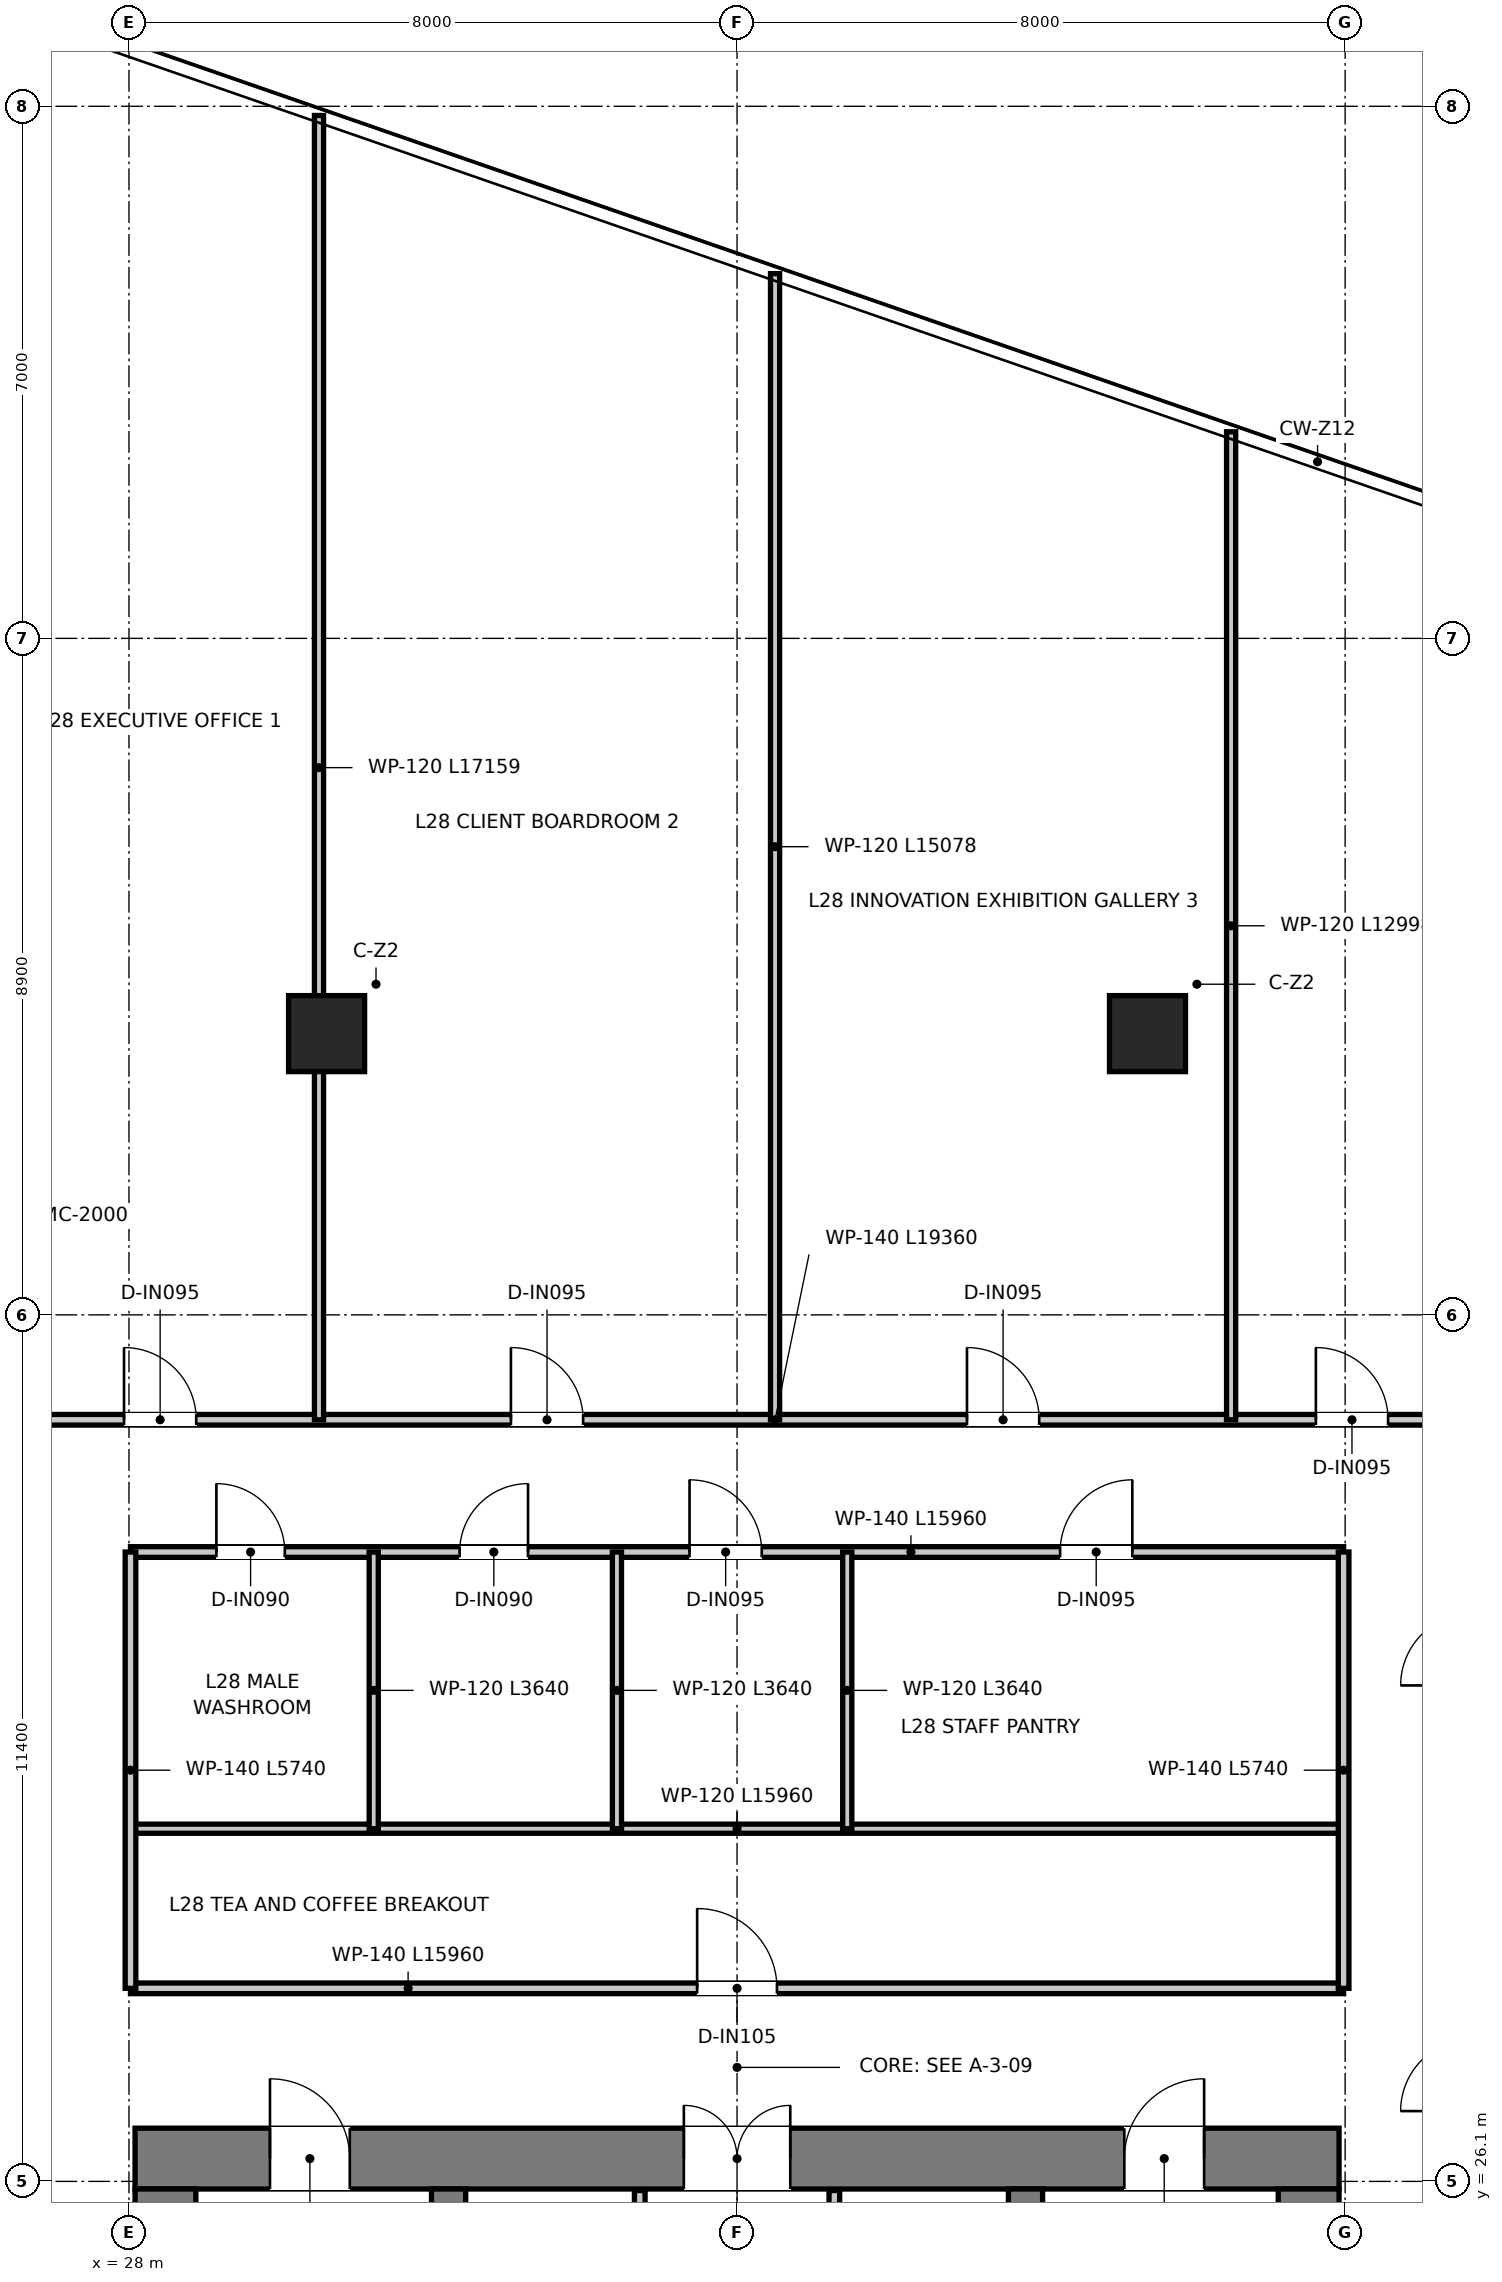
"""IFC4 building model, lengths in metres.
Left out: names, types, materials, properties, quantities, classifications, styles, units other than length and angle.
Written with IfcOpenShell. Run it as: python <this file> out.ifc"""

import sys

from ifc_helpers import new_model, si_unit, direction, frame, frame_2d, origin, origin_2d, place, context, subcontext, project, spatial, rectangle, extrude, source, transform, mapped, element, fill, save


model = new_model("IFC4")
c1 = context("Model", 3, precision=1e-05, world=origin(), true_north=direction((0.0, 1.0)))
c2 = subcontext(c1, "Body", "Model", "MODEL_VIEW")
j1 = project(units=[si_unit("LENGTHUNIT", "METRE"), si_unit("PLANEANGLEUNIT", "RADIAN")], contexts=[c1])
p1 = place(None, origin())
s1 = spatial("IfcSite", under=j1, at=p1, CompositionType="ELEMENT")
p2 = place(p1, origin())
s2 = spatial("IfcBuilding", under=s1, at=p2, CompositionType="ELEMENT")
p3 = place(p2, frame((0.0, 0.0, 117.7)))
s3 = spatial("IfcBuildingStorey", under=s2, at=p3, CompositionType="ELEMENT", Elevation=117.7)
p4 = place(p3, frame((28.08, 26.4, 0.0), z_axis=(0.0, 0.0, 1.0), x_axis=(1.0, 0.0, 0.0)))
e1 = element("IfcWall", 1, at=p4, inside=s3, PredefinedType="SHEAR", context=c2, shape_type="SweptSolid", body=[
    extrude(rectangle(XDim=15.84, YDim=0.8, at=frame_2d((7.92, 0.0))), origin(), (0.0, 0.0, 1.0), 3.95),
])
p5 = place(p4, frame((7.22, 0.0, 0.0)))
e2 = element("IfcOpeningElement", 2, at=p5, cuts=e1, PredefinedType="OPENING", context=c2, shape_type="SweptSolid", body=[
    extrude(rectangle(XDim=1.4, YDim=2.2, at=frame_2d((0.7, 1.1))), frame((0.0, 0.41, 0.0), z_axis=(0.0, -1.0, 0.0), x_axis=(1.0, 0.0, 0.0)), (0.0, 0.0, 1.0), 0.82),
])
p6 = place(p4, frame((1.775, 0.0, 0.0)))
e3 = element("IfcOpeningElement", 3, at=p6, cuts=e1, PredefinedType="OPENING", context=c2, shape_type="SweptSolid", body=[
    extrude(rectangle(XDim=1.05, YDim=2.1, at=frame_2d((0.525, 1.05))), frame((0.0, 0.41, 0.0), z_axis=(0.0, -1.0, 0.0), x_axis=(1.0, 0.0, 0.0)), (0.0, 0.0, 1.0), 0.82),
])
p7 = place(p4, frame((13.015, 0.0, 0.0)))
e4 = element("IfcOpeningElement", 4, at=p7, cuts=e1, PredefinedType="OPENING", context=c2, shape_type="SweptSolid", body=[
    extrude(rectangle(XDim=1.05, YDim=2.1, at=frame_2d((0.525, 1.05))), frame((0.0, 0.41, 0.0), z_axis=(0.0, -1.0, 0.0), x_axis=(1.0, 0.0, 0.0)), (0.0, 0.0, 1.0), 0.82),
])
for number, where, z_axis, x_axis in (
    (5, (28.48, 11.3, 0.0), (0.0, 0.0, 1.0), (0.0, 1.0, 0.0)),
    (6, (43.52, 11.3, 0.0), (0.0, 0.0, 1.0), (0.0, 1.0, 0.0)),
):
    element("IfcWall", number, at=place(p3, frame(where, z_axis=z_axis, x_axis=x_axis)), inside=s3, PredefinedType="SHEAR", context=c2, shape_type="SweptSolid", body=[
        extrude(rectangle(XDim=14.7, YDim=0.8, at=frame_2d((7.35, 0.0))), origin(), (0.0, 0.0, 1.0), 3.95),
    ])
p8 = place(p3, frame((32.205, 13.22, 0.0), z_axis=(0.0, 0.0, 1.0), x_axis=(0.0, 1.0, 0.0)))
e7 = element("IfcWall", 7, at=p8, inside=s3, PredefinedType="SHEAR", context=c2, shape_type="SweptSolid", body=[
    extrude(rectangle(XDim=12.78, YDim=0.45, at=frame_2d((6.39, 0.0))), origin(), (0.0, 0.0, 1.0), 3.95),
])
p9 = place(p8, frame((10.58, 0.0, 0.0)))
e8 = element("IfcOpeningElement", 8, at=p9, cuts=e7, PredefinedType="OPENING", context=c2, shape_type="SweptSolid", body=[
    extrude(rectangle(XDim=1.1, YDim=2.15, at=frame_2d((0.55, 1.075))), frame((0.0, 0.235, 0.0), z_axis=(0.0, -1.0, 0.0), x_axis=(1.0, 0.0, 0.0)), (0.0, 0.0, 1.0), 0.47),
])
p10 = place(p3, frame((39.795, 13.22, 0.0), z_axis=(0.0, 0.0, 1.0), x_axis=(0.0, 1.0, 0.0)))
e9 = element("IfcWall", 9, at=p10, inside=s3, PredefinedType="SHEAR", context=c2, shape_type="SweptSolid", body=[
    extrude(rectangle(XDim=12.78, YDim=0.45, at=frame_2d((6.39, 0.0))), origin(), (0.0, 0.0, 1.0), 3.95),
])
p11 = place(p10, frame((10.58, 0.0, 0.0)))
e10 = element("IfcOpeningElement", 10, at=p11, cuts=e9, PredefinedType="OPENING", context=c2, shape_type="SweptSolid", body=[
    extrude(rectangle(XDim=1.1, YDim=2.15, at=frame_2d((0.55, 1.075))), frame((0.0, 0.235, 0.0), z_axis=(0.0, -1.0, 0.0), x_axis=(1.0, 0.0, 0.0)), (0.0, 0.0, 1.0), 0.47),
])
m1 = source(origin(), c2, "Body", "SweptSolid", [
    extrude(rectangle(XDim=1.0, YDim=1.0, at=origin_2d()), origin(), (0.0, 0.0, 1.0), 3.95),
])
for number, where, z_axis, x_axis in (
    (11, (30.6, 41.2, 0.0), (0.0, 0.0, 1.0), (1.0, 0.0, 0.0)),
    (12, (41.4, 41.2, 0.0), (0.0, 0.0, 1.0), (1.0, 0.0, 0.0)),
):
    element("IfcColumn", number, at=place(p3, frame(where, z_axis=z_axis, x_axis=x_axis)), inside=s3, PredefinedType="COLUMN", context=c2, shape_type="MappedRepresentation", body=[
        mapped(m1, transform((0.0, 0.0, 0.0), x_axis=(1.0, 0.0, 0.0), y_axis=(0.0, 1.0, 0.0), z_axis=(0.0, 0.0, 1.0), scale=1.0)),
    ])
p12 = place(p3, frame((34.72, 20.2, 0.0), z_axis=(0.0, 0.0, 1.0), x_axis=(0.0, 1.0, 0.0)))
e13 = element("IfcWall", 13, at=p12, inside=s3, PredefinedType="PARTITIONING", context=c2, shape_type="SweptSolid", body=[
    extrude(rectangle(XDim=5.78, YDim=0.14, at=frame_2d((2.89, 0.0))), origin(), (0.0, 0.0, 1.0), 2.67),
])
p13 = place(p12, frame((1.05, 0.0, 0.0)))
e14 = element("IfcOpeningElement", 14, at=p13, cuts=e13, PredefinedType="OPENING", context=c2, shape_type="SweptSolid", body=[
    extrude(rectangle(XDim=0.9, YDim=2.1, at=frame_2d((0.45, 1.05))), frame((0.0, 0.08, 0.0), z_axis=(0.0, -1.0, 0.0), x_axis=(1.0, 0.0, 0.0)), (0.0, 0.0, 1.0), 0.16),
])
p14 = place(p3, frame((37.28, 20.2, 0.0), z_axis=(0.0, 0.0, 1.0), x_axis=(0.0, 1.0, 0.0)))
e15 = element("IfcWall", 15, at=p14, inside=s3, PredefinedType="PARTITIONING", context=c2, shape_type="SweptSolid", body=[
    extrude(rectangle(XDim=5.78, YDim=0.14, at=frame_2d((2.89, 0.0))), origin(), (0.0, 0.0, 1.0), 2.67),
])
p15 = place(p14, frame((0.95, 0.0, 0.0)))
e16 = element("IfcOpeningElement", 16, at=p15, cuts=e15, PredefinedType="OPENING", context=c2, shape_type="SweptSolid", body=[
    extrude(rectangle(XDim=1.1, YDim=2.15, at=frame_2d((0.55, 1.075))), frame((0.0, 0.08, 0.0), z_axis=(0.0, -1.0, 0.0), x_axis=(1.0, 0.0, 0.0)), (0.0, 0.0, 1.0), 0.16),
])
p16 = place(p3, frame((28.02, 28.64, 0.0), z_axis=(0.0, 0.0, 1.0), x_axis=(1.0, 0.0, 0.0)))
e17 = element("IfcWall", 17, at=p16, inside=s3, PredefinedType="PARTITIONING", context=c2, shape_type="SweptSolid", body=[
    extrude(rectangle(XDim=15.96, YDim=0.14, at=frame_2d((7.98, 0.0))), origin(), (0.0, 0.0, 1.0), 3.08),
])
p17 = place(p16, frame((7.455, 0.0, 0.0)))
e18 = element("IfcOpeningElement", 18, at=p17, cuts=e17, PredefinedType="OPENING", context=c2, shape_type="SweptSolid", body=[
    extrude(rectangle(XDim=1.05, YDim=2.15, at=frame_2d((0.525, 1.075))), frame((0.0, 0.08, 0.0), z_axis=(0.0, -1.0, 0.0), x_axis=(1.0, 0.0, 0.0)), (0.0, 0.0, 1.0), 0.16),
])
p18 = place(p3, frame((28.02, 30.74, 0.0), z_axis=(0.0, 0.0, 1.0), x_axis=(1.0, 0.0, 0.0)))
e19 = element("IfcWall", 19, at=p18, inside=s3, PredefinedType="PARTITIONING", context=c2, shape_type="SweptSolid", body=[
    extrude(rectangle(XDim=15.96, YDim=0.12, at=frame_2d((7.98, 0.0))), origin(), (0.0, 0.0, 1.0), 3.08),
])
p19 = place(p3, frame((28.02, 34.38, 0.0), z_axis=(0.0, 0.0, 1.0), x_axis=(1.0, 0.0, 0.0)))
e20 = element("IfcWall", 20, at=p19, inside=s3, PredefinedType="PARTITIONING", context=c2, shape_type="SweptSolid", body=[
    extrude(rectangle(XDim=15.96, YDim=0.14, at=frame_2d((7.98, 0.0))), origin(), (0.0, 0.0, 1.0), 3.08),
])
p20 = place(p19, frame((1.13, 0.0, 0.0)))
e21 = element("IfcOpeningElement", 21, at=p20, cuts=e20, PredefinedType="OPENING", context=c2, shape_type="SweptSolid", body=[
    extrude(rectangle(XDim=0.9, YDim=2.1, at=frame_2d((0.45, 1.05))), frame((0.0, 0.08, 0.0), z_axis=(0.0, -1.0, 0.0), x_axis=(1.0, 0.0, 0.0)), (0.0, 0.0, 1.0), 0.16),
])
p21 = place(p19, frame((4.33, 0.0, 0.0)))
e22 = element("IfcOpeningElement", 22, at=p21, cuts=e20, PredefinedType="OPENING", context=c2, shape_type="SweptSolid", body=[
    extrude(rectangle(XDim=0.9, YDim=2.1, at=frame_2d((0.45, 1.05))), frame((0.0, 0.08, 0.0), z_axis=(0.0, -1.0, 0.0), x_axis=(1.0, 0.0, 0.0)), (0.0, 0.0, 1.0), 0.16),
])
p22 = place(p19, frame((7.355, 0.0, 0.0)))
e23 = element("IfcOpeningElement", 23, at=p22, cuts=e20, PredefinedType="OPENING", context=c2, shape_type="SweptSolid", body=[
    extrude(rectangle(XDim=0.95, YDim=2.1, at=frame_2d((0.475, 1.05))), frame((0.0, 0.08, 0.0), z_axis=(0.0, -1.0, 0.0), x_axis=(1.0, 0.0, 0.0)), (0.0, 0.0, 1.0), 0.16),
])
p23 = place(p19, frame((12.23, 0.0, 0.0)))
e24 = element("IfcOpeningElement", 24, at=p23, cuts=e20, PredefinedType="OPENING", context=c2, shape_type="SweptSolid", body=[
    extrude(rectangle(XDim=0.95, YDim=2.1, at=frame_2d((0.475, 1.05))), frame((0.0, 0.08, 0.0), z_axis=(0.0, -1.0, 0.0), x_axis=(1.0, 0.0, 0.0)), (0.0, 0.0, 1.0), 0.16),
])
for number, where, z_axis, x_axis in (
    (25, (28.02, 28.64, 0.0), (0.0, 0.0, 1.0), (0.0, 1.0, 0.0)),
    (26, (43.98, 28.64, 0.0), (0.0, 0.0, 1.0), (0.0, 1.0, 0.0)),
):
    element("IfcWall", number, at=place(p3, frame(where, z_axis=z_axis, x_axis=x_axis)), inside=s3, PredefinedType="PARTITIONING", context=c2, shape_type="SweptSolid", body=[
        extrude(rectangle(XDim=5.74, YDim=0.14, at=frame_2d((2.87, 0.0))), origin(), (0.0, 0.0, 1.0), 3.27),
    ])
for number, where, z_axis, x_axis in (
    (27, (31.22, 30.74, 0.0), (0.0, 0.0, 1.0), (0.0, 1.0, 0.0)),
    (28, (34.42, 30.74, 0.0), (0.0, 0.0, 1.0), (0.0, 1.0, 0.0)),
    (29, (37.45, 30.74, 0.0), (0.0, 0.0, 1.0), (0.0, 1.0, 0.0)),
):
    element("IfcWall", number, at=place(p3, frame(where, z_axis=z_axis, x_axis=x_axis)), inside=s3, PredefinedType="PARTITIONING", context=c2, shape_type="SweptSolid", body=[
        extrude(rectangle(XDim=3.64, YDim=0.12, at=frame_2d((1.82, 0.0))), origin(), (0.0, 0.0, 1.0), 3.17),
    ])
p24 = place(p3, frame((26.32, 36.12, 0.0), z_axis=(0.0, 0.0, 1.0), x_axis=(1.0, 0.0, 0.0)))
e30 = element("IfcWall", 30, at=p24, inside=s3, PredefinedType="PARTITIONING", context=c2, shape_type="SweptSolid", body=[
    extrude(rectangle(XDim=19.36, YDim=0.14, at=frame_2d((9.68, 0.0))), origin(), (0.0, 0.0, 1.0), 3.08),
])
p25 = place(p24, frame((1.615, 0.0, 0.0)))
e31 = element("IfcOpeningElement", 31, at=p25, cuts=e30, PredefinedType="OPENING", context=c2, shape_type="SweptSolid", body=[
    extrude(rectangle(XDim=0.95, YDim=2.1, at=frame_2d((0.475, 1.05))), frame((0.0, 0.08, 0.0), z_axis=(0.0, -1.0, 0.0), x_axis=(1.0, 0.0, 0.0)), (0.0, 0.0, 1.0), 0.16),
])
p26 = place(p24, frame((6.705, 0.0, 0.0)))
e32 = element("IfcOpeningElement", 32, at=p26, cuts=e30, PredefinedType="OPENING", context=c2, shape_type="SweptSolid", body=[
    extrude(rectangle(XDim=0.95, YDim=2.1, at=frame_2d((0.475, 1.05))), frame((0.0, 0.08, 0.0), z_axis=(0.0, -1.0, 0.0), x_axis=(1.0, 0.0, 0.0)), (0.0, 0.0, 1.0), 0.16),
])
p27 = place(p24, frame((12.705, 0.0, 0.0)))
e33 = element("IfcOpeningElement", 33, at=p27, cuts=e30, PredefinedType="OPENING", context=c2, shape_type="SweptSolid", body=[
    extrude(rectangle(XDim=0.95, YDim=2.1, at=frame_2d((0.475, 1.05))), frame((0.0, 0.08, 0.0), z_axis=(0.0, -1.0, 0.0), x_axis=(1.0, 0.0, 0.0)), (0.0, 0.0, 1.0), 0.16),
])
p28 = place(p24, frame((17.295, 0.0, 0.0)))
e34 = element("IfcOpeningElement", 34, at=p28, cuts=e30, PredefinedType="OPENING", context=c2, shape_type="SweptSolid", body=[
    extrude(rectangle(XDim=0.95, YDim=2.1, at=frame_2d((0.475, 1.05))), frame((0.0, 0.08, 0.0), z_axis=(0.0, -1.0, 0.0), x_axis=(1.0, 0.0, 0.0)), (0.0, 0.0, 1.0), 0.16),
])
p29 = place(p3, frame((30.5, 36.12, 0.0), z_axis=(0.0, 0.0, 1.0), x_axis=(0.0, 1.0, 0.0)))
e35 = element("IfcWall", 35, at=p29, inside=s3, PredefinedType="PARTITIONING", context=c2, shape_type="SweptSolid", body=[
    extrude(rectangle(XDim=17.159, YDim=0.12, at=frame_2d((8.58, 0.0))), origin(), (0.0, 0.0, 1.0), 2.97),
])
p30 = place(p3, frame((36.5, 36.12, 0.0), z_axis=(0.0, 0.0, 1.0), x_axis=(0.0, 1.0, 0.0)))
e36 = element("IfcWall", 36, at=p30, inside=s3, PredefinedType="PARTITIONING", context=c2, shape_type="SweptSolid", body=[
    extrude(rectangle(XDim=15.078, YDim=0.12, at=frame_2d((7.539, 0.0))), origin(), (0.0, 0.0, 1.0), 2.97),
])
p31 = place(p3, frame((42.5, 36.12, 0.0), z_axis=(0.0, 0.0, 1.0), x_axis=(0.0, 1.0, 0.0)))
e37 = element("IfcWall", 37, at=p31, inside=s3, PredefinedType="PARTITIONING", context=c2, shape_type="SweptSolid", body=[
    extrude(rectangle(XDim=12.998, YDim=0.12, at=frame_2d((6.499, 0.0))), origin(), (0.0, 0.0, 1.0), 2.97),
])
p32 = place(p5, origin())
e38 = element("IfcDoor", 38, at=p32, inside=s3, OperationType="DOUBLE_DOOR_SINGLE_SWING", PredefinedType="DOOR", context=c2, shape_type="SweptSolid", body=[
    extrude(rectangle(XDim=1.4, YDim=2.2, at=frame_2d((0.7, 1.1))), frame((0.0, 0.025, 0.0), z_axis=(0.0, -1.0, 0.0), x_axis=(1.0, 0.0, 0.0)), (0.0, 0.0, 1.0), 0.05),
])
fill(e2, e38)
p33 = place(p6, origin())
e39 = element("IfcDoor", 39, at=p33, inside=s3, OperationType="SINGLE_SWING_LEFT", PredefinedType="DOOR", context=c2, shape_type="SweptSolid", body=[
    extrude(rectangle(XDim=1.05, YDim=2.1, at=frame_2d((0.525, 1.05))), frame((0.0, 0.025, 0.0), z_axis=(0.0, -1.0, 0.0), x_axis=(1.0, 0.0, 0.0)), (0.0, 0.0, 1.0), 0.05),
])
fill(e3, e39)
p34 = place(p7, origin())
e40 = element("IfcDoor", 40, at=p34, inside=s3, OperationType="SINGLE_SWING_RIGHT", PredefinedType="DOOR", context=c2, shape_type="SweptSolid", body=[
    extrude(rectangle(XDim=1.05, YDim=2.1, at=frame_2d((0.525, 1.05))), frame((0.0, 0.025, 0.0), z_axis=(0.0, -1.0, 0.0), x_axis=(1.0, 0.0, 0.0)), (0.0, 0.0, 1.0), 0.05),
])
fill(e4, e40)
p35 = place(p17, origin())
e41 = element("IfcDoor", 41, at=p35, inside=s3, OperationType="SINGLE_SWING_LEFT", PredefinedType="DOOR", context=c2, shape_type="SweptSolid", body=[
    extrude(rectangle(XDim=1.05, YDim=2.15, at=frame_2d((0.525, 1.075))), frame((0.0, 0.025, 0.0), z_axis=(0.0, -1.0, 0.0), x_axis=(1.0, 0.0, 0.0)), (0.0, 0.0, 1.0), 0.05),
])
fill(e18, e41)
p36 = place(p20, origin())
e42 = element("IfcDoor", 42, at=p36, inside=s3, OperationType="SINGLE_SWING_LEFT", PredefinedType="DOOR", context=c2, shape_type="SweptSolid", body=[
    extrude(rectangle(XDim=0.9, YDim=2.1, at=frame_2d((0.45, 1.05))), frame((0.0, 0.025, 0.0), z_axis=(0.0, -1.0, 0.0), x_axis=(1.0, 0.0, 0.0)), (0.0, 0.0, 1.0), 0.05),
])
fill(e21, e42)
p37 = place(p21, origin())
e43 = element("IfcDoor", 43, at=p37, inside=s3, OperationType="SINGLE_SWING_RIGHT", PredefinedType="DOOR", context=c2, shape_type="SweptSolid", body=[
    extrude(rectangle(XDim=0.9, YDim=2.1, at=frame_2d((0.45, 1.05))), frame((0.0, 0.025, 0.0), z_axis=(0.0, -1.0, 0.0), x_axis=(1.0, 0.0, 0.0)), (0.0, 0.0, 1.0), 0.05),
])
fill(e22, e43)
p38 = place(p22, origin())
e44 = element("IfcDoor", 44, at=p38, inside=s3, OperationType="SINGLE_SWING_LEFT", PredefinedType="DOOR", context=c2, shape_type="SweptSolid", body=[
    extrude(rectangle(XDim=0.95, YDim=2.1, at=frame_2d((0.475, 1.05))), frame((0.0, 0.025, 0.0), z_axis=(0.0, -1.0, 0.0), x_axis=(1.0, 0.0, 0.0)), (0.0, 0.0, 1.0), 0.05),
])
fill(e23, e44)
p39 = place(p23, origin())
e45 = element("IfcDoor", 45, at=p39, inside=s3, OperationType="SINGLE_SWING_RIGHT", PredefinedType="DOOR", context=c2, shape_type="SweptSolid", body=[
    extrude(rectangle(XDim=0.95, YDim=2.1, at=frame_2d((0.475, 1.05))), frame((0.0, 0.025, 0.0), z_axis=(0.0, -1.0, 0.0), x_axis=(1.0, 0.0, 0.0)), (0.0, 0.0, 1.0), 0.05),
])
fill(e24, e45)
p40 = place(p25, origin())
e46 = element("IfcDoor", 46, at=p40, inside=s3, OperationType="SINGLE_SWING_LEFT", PredefinedType="DOOR", context=c2, shape_type="SweptSolid", body=[
    extrude(rectangle(XDim=0.95, YDim=2.1, at=frame_2d((0.475, 1.05))), frame((0.0, 0.025, 0.0), z_axis=(0.0, -1.0, 0.0), x_axis=(1.0, 0.0, 0.0)), (0.0, 0.0, 1.0), 0.05),
])
fill(e31, e46)
p41 = place(p26, origin())
e47 = element("IfcDoor", 47, at=p41, inside=s3, OperationType="SINGLE_SWING_LEFT", PredefinedType="DOOR", context=c2, shape_type="SweptSolid", body=[
    extrude(rectangle(XDim=0.95, YDim=2.1, at=frame_2d((0.475, 1.05))), frame((0.0, 0.025, 0.0), z_axis=(0.0, -1.0, 0.0), x_axis=(1.0, 0.0, 0.0)), (0.0, 0.0, 1.0), 0.05),
])
fill(e32, e47)
p42 = place(p27, origin())
e48 = element("IfcDoor", 48, at=p42, inside=s3, OperationType="SINGLE_SWING_LEFT", PredefinedType="DOOR", context=c2, shape_type="SweptSolid", body=[
    extrude(rectangle(XDim=0.95, YDim=2.1, at=frame_2d((0.475, 1.05))), frame((0.0, 0.025, 0.0), z_axis=(0.0, -1.0, 0.0), x_axis=(1.0, 0.0, 0.0)), (0.0, 0.0, 1.0), 0.05),
])
fill(e33, e48)
p43 = place(p28, origin())
e49 = element("IfcDoor", 49, at=p43, inside=s3, OperationType="SINGLE_SWING_LEFT", PredefinedType="DOOR", context=c2, shape_type="SweptSolid", body=[
    extrude(rectangle(XDim=0.95, YDim=2.1, at=frame_2d((0.475, 1.05))), frame((0.0, 0.025, 0.0), z_axis=(0.0, -1.0, 0.0), x_axis=(1.0, 0.0, 0.0)), (0.0, 0.0, 1.0), 0.05),
])
fill(e34, e49)
save(model, sys.argv[1])
